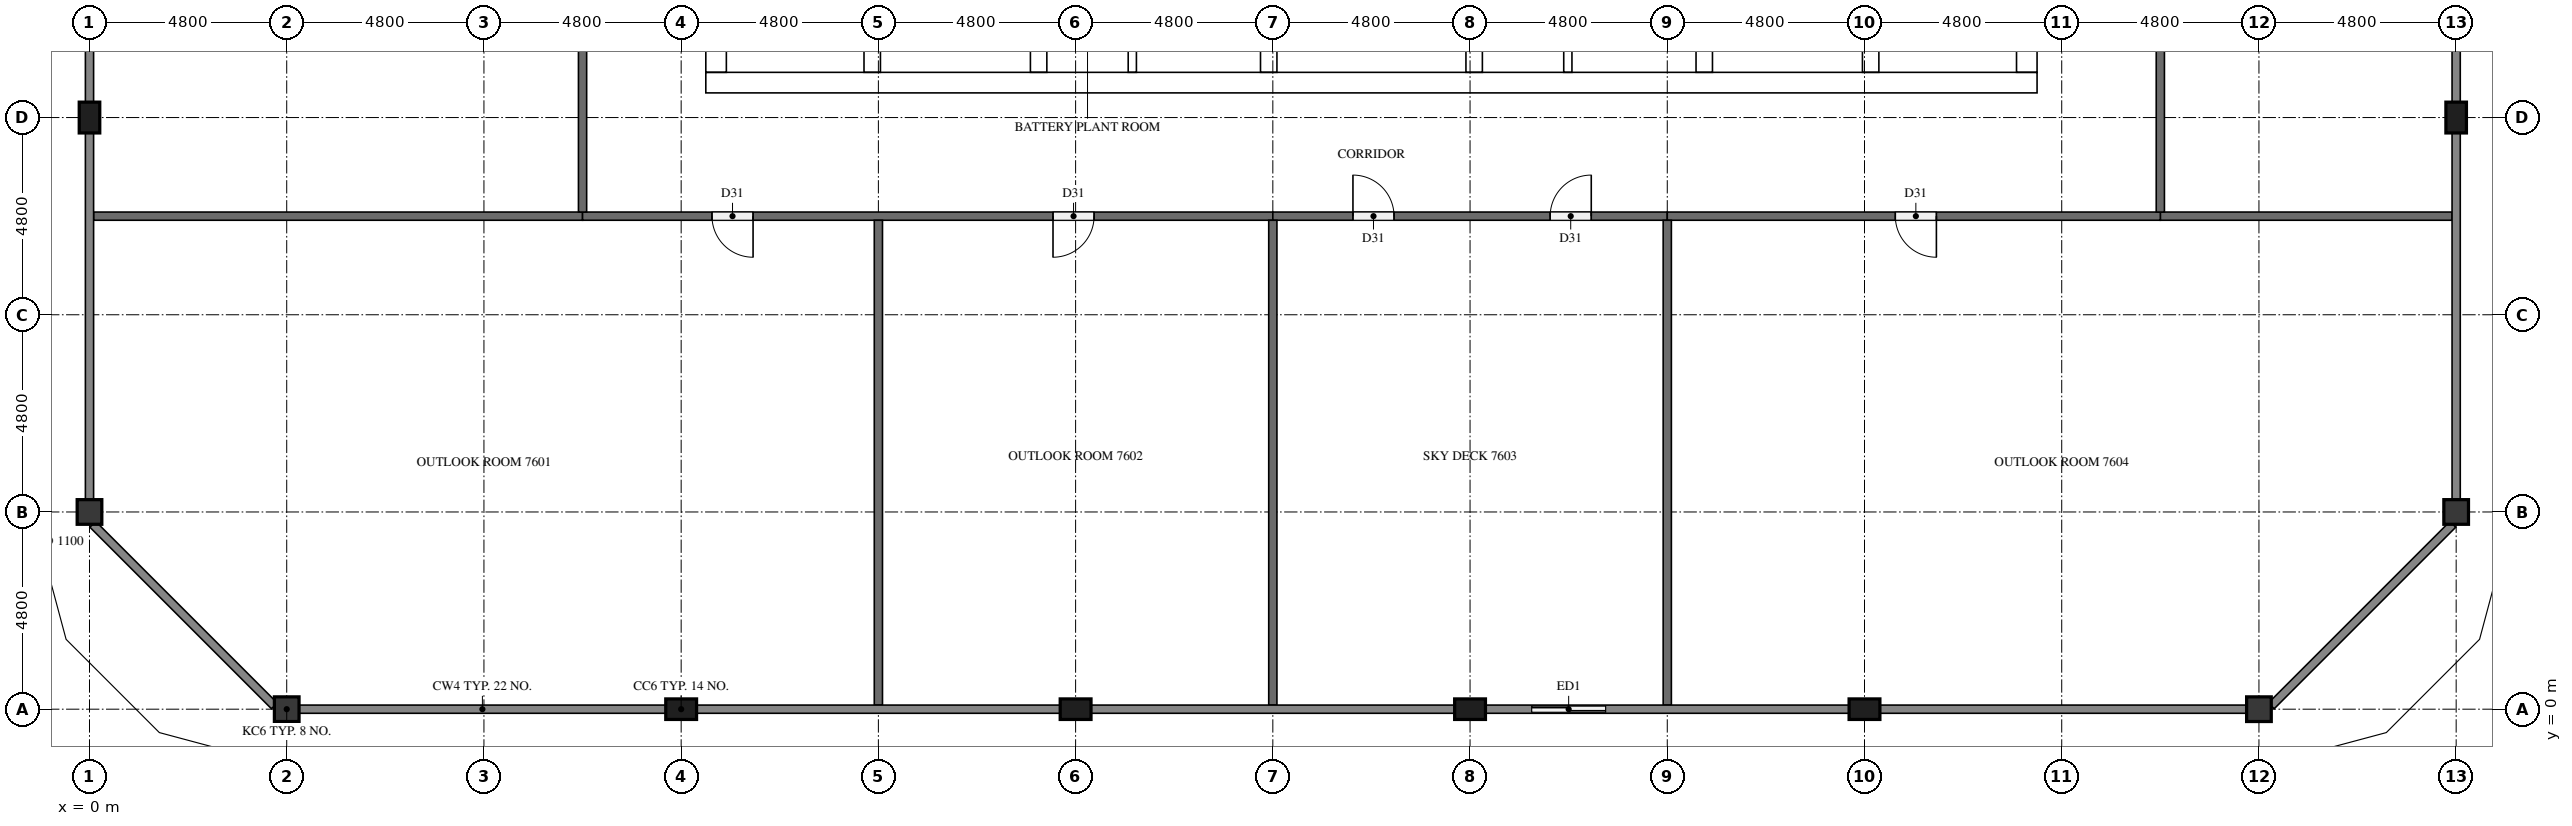
"""IFC4 building model, lengths in metres.
Left out: names, types, materials, properties, quantities, classifications, styles, units other than length and angle.
Written with IfcOpenShell. Run it as: python <this file> out.ifc"""

import sys

from ifc_helpers import new_model, si_unit, direction, frame, frame_2d, origin, origin_2d, place, context, subcontext, project, spatial, rectangle, extrude, element, fill, save


model = new_model("IFC4")
c1 = context("Model", 3, precision=1e-05, world=origin(), true_north=direction((0.0, 1.0)))
c2 = subcontext(c1, "Body", "Model", "MODEL_VIEW")
j1 = project(units=[si_unit("LENGTHUNIT", "METRE"), si_unit("PLANEANGLEUNIT", "RADIAN")], contexts=[c1])
p1 = place(None, origin())
s1 = spatial("IfcSite", under=j1, at=p1, CompositionType="ELEMENT")
p2 = place(p1, origin())
s2 = spatial("IfcBuilding", under=s1, at=p2, CompositionType="ELEMENT")
p3 = place(p2, frame((0.0, 0.0, 291.5)))
s3 = spatial("IfcBuildingStorey", under=s2, at=p3, CompositionType="ELEMENT", Elevation=291.5)
p4 = place(p3, frame((15.0, 15.25, 0.0), z_axis=(0.0, 0.0, 1.0), x_axis=(1.0, 0.0, 0.0)))
e1 = element("IfcWall", 1, at=p4, inside=s3, PredefinedType="SHEAR", context=c2, shape_type="SweptSolid", body=[
    extrude(rectangle(XDim=32.4, YDim=0.5, at=frame_2d((16.2, 0.0))), origin(), (0.0, 0.0, 1.0), 4.4),
])
p5 = place(p4, frame((15.3, 0.0, 0.0)))
e2 = element("IfcOpeningElement", 2, at=p5, cuts=e1, PredefinedType="OPENING", context=c2, shape_type="SweptSolid", body=[
    extrude(rectangle(XDim=1.8, YDim=2.1, at=frame_2d((0.9, 1.05))), frame((0.0, 0.26, 0.0), z_axis=(0.0, -1.0, 0.0), x_axis=(1.0, 0.0, 0.0)), (0.0, 0.0, 1.0), 0.52),
])
p6 = place(p3, frame((15.25, 15.5, 0.0), z_axis=(0.0, 0.0, 1.0), x_axis=(0.0, 1.0, 0.0)))
e3 = element("IfcWall", 3, at=p6, inside=s3, PredefinedType="SHEAR", context=c2, shape_type="SweptSolid", body=[
    extrude(rectangle(XDim=21.8, YDim=0.5, at=frame_2d((10.9, 0.0))), origin(), (0.0, 0.0, 1.0), 4.4),
])
p7 = place(p6, frame((5.26, 0.0, 0.0)))
e4 = element("IfcOpeningElement", 4, at=p7, cuts=e3, PredefinedType="OPENING", context=c2, shape_type="SweptSolid", body=[
    extrude(rectangle(XDim=1.2, YDim=2.1, at=frame_2d((0.6, 1.05))), frame((0.0, 0.26, 0.0), z_axis=(0.0, -1.0, 0.0), x_axis=(1.0, 0.0, 0.0)), (0.0, 0.0, 1.0), 0.52),
])
p8 = place(p3, frame((47.15, 15.5, 0.0), z_axis=(0.0, 0.0, 1.0), x_axis=(0.0, 1.0, 0.0)))
e5 = element("IfcWall", 5, at=p8, inside=s3, PredefinedType="SHEAR", context=c2, shape_type="SweptSolid", body=[
    extrude(rectangle(XDim=21.8, YDim=0.5, at=frame_2d((10.9, 0.0))), origin(), (0.0, 0.0, 1.0), 4.4),
])
p9 = place(p8, frame((10.6, 0.0, 0.0)))
e6 = element("IfcOpeningElement", 6, at=p9, cuts=e5, PredefinedType="OPENING", context=c2, shape_type="SweptSolid", body=[
    extrude(rectangle(XDim=1.2, YDim=2.1, at=frame_2d((0.6, 1.05))), frame((0.0, 0.26, 0.0), z_axis=(0.0, -1.0, 0.0), x_axis=(1.0, 0.0, 0.0)), (0.0, 0.0, 1.0), 0.52),
])
p10 = place(p3, frame((19.05, 15.5, 0.0), z_axis=(0.0, 0.0, 1.0), x_axis=(0.0, 1.0, 0.0)))
e7 = element("IfcWall", 7, at=p10, inside=s3, PredefinedType="SHEAR", context=c2, shape_type="SweptSolid", body=[
    extrude(rectangle(XDim=15.55, YDim=0.4, at=frame_2d((7.775, 0.0))), origin(), (0.0, 0.0, 1.0), 4.4),
])
p11 = place(p10, frame((9.95, 0.0, 0.0)))
e8 = element("IfcOpeningElement", 8, at=p11, cuts=e7, PredefinedType="OPENING", context=c2, shape_type="SweptSolid", body=[
    extrude(rectangle(XDim=1.1, YDim=2.1, at=frame_2d((0.55, 1.05))), frame((0.0, 0.21, 0.0), z_axis=(0.0, -1.0, 0.0), x_axis=(1.0, 0.0, 0.0)), (0.0, 0.0, 1.0), 0.42),
])
p12 = place(p10, frame((13.45, 0.0, 0.0)))
e9 = element("IfcOpeningElement", 9, at=p12, cuts=e7, PredefinedType="OPENING", context=c2, shape_type="SweptSolid", body=[
    extrude(rectangle(XDim=1.1, YDim=2.1, at=frame_2d((0.55, 1.05))), frame((0.0, 0.21, 0.0), z_axis=(0.0, -1.0, 0.0), x_axis=(1.0, 0.0, 0.0)), (0.0, 0.0, 1.0), 0.42),
])
p13 = place(p10, frame((0.7, 0.0, 0.0)))
e10 = element("IfcOpeningElement", 10, at=p13, cuts=e7, PredefinedType="OPENING", context=c2, shape_type="SweptSolid", body=[
    extrude(rectangle(XDim=1.2, YDim=2.1, at=frame_2d((0.6, 1.05))), frame((0.0, 0.21, 0.0), z_axis=(0.0, -1.0, 0.0), x_axis=(1.0, 0.0, 0.0)), (0.0, 0.0, 1.0), 0.42),
])
p14 = place(p3, frame((23.1, 15.5, 0.0), z_axis=(0.0, 0.0, 1.0), x_axis=(0.0, 1.0, 0.0)))
e11 = element("IfcWall", 11, at=p14, inside=s3, PredefinedType="SHEAR", context=c2, shape_type="SweptSolid", body=[
    extrude(rectangle(XDim=21.8, YDim=0.4, at=frame_2d((10.9, 0.0))), origin(), (0.0, 0.0, 1.0), 4.4),
])
p15 = place(p3, frame((39.3, 15.5, 0.0), z_axis=(0.0, 0.0, 1.0), x_axis=(0.0, 1.0, 0.0)))
e12 = element("IfcWall", 12, at=p15, inside=s3, PredefinedType="SHEAR", context=c2, shape_type="SweptSolid", body=[
    extrude(rectangle(XDim=8.75, YDim=0.4, at=frame_2d((4.375, 0.0))), origin(), (0.0, 0.0, 1.0), 4.4),
])
p16 = place(p3, frame((43.35, 15.5, 0.0), z_axis=(0.0, 0.0, 1.0), x_axis=(0.0, 1.0, 0.0)))
e13 = element("IfcWall", 13, at=p16, inside=s3, PredefinedType="SHEAR", context=c2, shape_type="SweptSolid", body=[
    extrude(rectangle(XDim=8.75, YDim=0.4, at=frame_2d((4.375, 0.0))), origin(), (0.0, 0.0, 1.0), 4.4),
])
p17 = place(p16, frame((0.7, 0.0, 0.0)))
e14 = element("IfcOpeningElement", 14, at=p17, cuts=e13, PredefinedType="OPENING", context=c2, shape_type="SweptSolid", body=[
    extrude(rectangle(XDim=1.2, YDim=2.1, at=frame_2d((0.6, 1.05))), frame((0.0, 0.21, 0.0), z_axis=(0.0, -1.0, 0.0), x_axis=(1.0, 0.0, 0.0)), (0.0, 0.0, 1.0), 0.42),
])
for number, where, z_axis, x_axis in (
    (15, (28.7, 15.5, 0.0), (0.0, 0.0, 1.0), (0.0, 1.0, 0.0)),
    (16, (33.7, 15.5, 0.0), (0.0, 0.0, 1.0), (0.0, 1.0, 0.0)),
):
    element("IfcWall", number, at=place(p3, frame(where, z_axis=z_axis, x_axis=x_axis)), inside=s3, PredefinedType="SHEAR", context=c2, shape_type="SweptSolid", body=[
        extrude(rectangle(XDim=3.05, YDim=0.4, at=frame_2d((1.525, 0.0))), origin(), (0.0, 0.0, 1.0), 4.4),
    ])
p18 = place(p3, frame((4.8, 0.0, 0.0), z_axis=(0.0, 0.0, 1.0), x_axis=(1.0, 0.0, 0.0)))
e17 = element("IfcColumn", 17, at=p18, inside=s3, PredefinedType="COLUMN", context=c2, shape_type="SweptSolid", body=[
    extrude(rectangle(XDim=0.6, YDim=0.6, at=origin_2d()), origin(), (0.0, 0.0, 1.0), 4.4),
])
for number, where, z_axis, x_axis in (
    (18, (14.4, 0.0, 0.0), (0.0, 0.0, 1.0), (1.0, 0.0, 0.0)),
    (19, (24.0, 0.0, 0.0), (0.0, 0.0, 1.0), (1.0, 0.0, 0.0)),
    (20, (33.6, 0.0, 0.0), (0.0, 0.0, 1.0), (1.0, 0.0, 0.0)),
    (21, (43.2, 0.0, 0.0), (0.0, 0.0, 1.0), (1.0, 0.0, 0.0)),
):
    element("IfcColumn", number, at=place(p3, frame(where, z_axis=z_axis, x_axis=x_axis)), inside=s3, PredefinedType="COLUMN", context=c2, shape_type="SweptSolid", body=[
        extrude(rectangle(XDim=0.75, YDim=0.5, at=origin_2d()), origin(), (0.0, 0.0, 1.0), 4.4),
    ])
for number, where, z_axis, x_axis in (
    (22, (52.8, 0.0, 0.0), (0.0, 0.0, 1.0), (1.0, 0.0, 0.0)),
    (23, (57.6, 4.8, 0.0), (0.0, 0.0, 1.0), (1.0, 0.0, 0.0)),
):
    element("IfcColumn", number, at=place(p3, frame(where, z_axis=z_axis, x_axis=x_axis)), inside=s3, PredefinedType="COLUMN", context=c2, shape_type="SweptSolid", body=[
        extrude(rectangle(XDim=0.6, YDim=0.6, at=origin_2d()), origin(), (0.0, 0.0, 1.0), 4.4),
    ])
for number, where, z_axis, x_axis in (
    (24, (57.6, 14.4, 0.0), (0.0, 0.0, 1.0), (0.0, 1.0, 0.0)),
    (25, (0.0, 14.4, 0.0), (0.0, 0.0, 1.0), (0.0, 1.0, 0.0)),
):
    element("IfcColumn", number, at=place(p3, frame(where, z_axis=z_axis, x_axis=x_axis)), inside=s3, PredefinedType="COLUMN", context=c2, shape_type="SweptSolid", body=[
        extrude(rectangle(XDim=0.75, YDim=0.5, at=origin_2d()), origin(), (0.0, 0.0, 1.0), 4.4),
    ])
p19 = place(p3, frame((0.0, 4.8, 0.0), z_axis=(0.0, 0.0, 1.0), x_axis=(1.0, 0.0, 0.0)))
e26 = element("IfcColumn", 26, at=p19, inside=s3, PredefinedType="COLUMN", context=c2, shape_type="SweptSolid", body=[
    extrude(rectangle(XDim=0.6, YDim=0.6, at=origin_2d()), origin(), (0.0, 0.0, 1.0), 4.4),
])
p20 = place(p3, frame((34.8, 0.0, 0.0), z_axis=(0.0, 0.0, 1.0), x_axis=(1.0, 0.0, 0.0)))
e27 = element("IfcWall", 27, at=p20, inside=s3, PredefinedType="SOLIDWALL", context=c2, shape_type="SweptSolid", body=[
    extrude(rectangle(XDim=2.4, YDim=0.15, at=frame_2d((1.2, 0.0))), origin(), (0.0, 0.0, 1.0), 4.4),
])
p21 = place(p20, frame((0.3, 0.0, 0.0)))
e28 = element("IfcOpeningElement", 28, at=p21, cuts=e27, PredefinedType="OPENING", context=c2, shape_type="SweptSolid", body=[
    extrude(rectangle(XDim=1.8, YDim=2.4, at=frame_2d((0.9, 1.2))), frame((0.0, 0.085, 0.0), z_axis=(0.0, -1.0, 0.0), x_axis=(1.0, 0.0, 0.0)), (0.0, 0.0, 1.0), 0.17),
])
for number, where, z_axis, x_axis in (
    (29, (25.38, 15.5, 0.0), (0.0, 0.0, 1.0), (0.0, 1.0, 0.0)),
    (30, (35.98, 15.5, 0.0), (0.0, 0.0, 1.0), (0.0, 1.0, 0.0)),
):
    element("IfcWall", number, at=place(p3, frame(where, z_axis=z_axis, x_axis=x_axis)), inside=s3, PredefinedType="PARTITIONING", context=c2, shape_type="SweptSolid", body=[
        extrude(rectangle(XDim=3.05, YDim=0.2, at=frame_2d((1.525, 0.0))), origin(), (0.0, 0.0, 1.0), 4.4),
    ])
p22 = place(p3, frame((0.1, 12.0, 0.0), z_axis=(0.0, 0.0, 1.0), x_axis=(1.0, 0.0, 0.0)))
e31 = element("IfcWall", 31, at=p22, inside=s3, PredefinedType="PARTITIONING", context=c2, shape_type="SweptSolid", body=[
    extrude(rectangle(XDim=11.9, YDim=0.2, at=frame_2d((5.95, 0.0))), origin(), (0.0, 0.0, 1.0), 4.4),
])
p23 = place(p3, frame((50.4, 12.0, 0.0), z_axis=(0.0, 0.0, 1.0), x_axis=(1.0, 0.0, 0.0)))
e32 = element("IfcWall", 32, at=p23, inside=s3, PredefinedType="PARTITIONING", context=c2, shape_type="SweptSolid", body=[
    extrude(rectangle(XDim=7.1, YDim=0.2, at=frame_2d((3.55, 0.0))), origin(), (0.0, 0.0, 1.0), 4.4),
])
p24 = place(p3, frame((28.8, 12.0, 0.0), z_axis=(0.0, 0.0, 1.0), x_axis=(-1.0, 0.0, 0.0)))
e33 = element("IfcWall", 33, at=p24, inside=s3, PredefinedType="PARTITIONING", context=c2, shape_type="SweptSolid", body=[
    extrude(rectangle(XDim=16.8, YDim=0.2, at=frame_2d((8.4, 0.0))), origin(), (0.0, 0.0, 1.0), 4.4),
])
p25 = place(p24, frame((12.65, 0.0, 0.0)))
e34 = element("IfcOpeningElement", 34, at=p25, cuts=e33, PredefinedType="OPENING", context=c2, shape_type="SweptSolid", body=[
    extrude(rectangle(XDim=1.0, YDim=2.1, at=frame_2d((0.5, 1.05))), frame((0.0, 0.11, 0.0), z_axis=(0.0, -1.0, 0.0), x_axis=(1.0, 0.0, 0.0)), (0.0, 0.0, 1.0), 0.22),
])
p26 = place(p24, frame((4.35, 0.0, 0.0)))
e35 = element("IfcOpeningElement", 35, at=p26, cuts=e33, PredefinedType="OPENING", context=c2, shape_type="SweptSolid", body=[
    extrude(rectangle(XDim=1.0, YDim=2.1, at=frame_2d((0.5, 1.05))), frame((0.0, 0.11, 0.0), z_axis=(0.0, -1.0, 0.0), x_axis=(1.0, 0.0, 0.0)), (0.0, 0.0, 1.0), 0.22),
])
p27 = place(p3, frame((28.8, 12.0, 0.0), z_axis=(0.0, 0.0, 1.0), x_axis=(1.0, 0.0, 0.0)))
e36 = element("IfcWall", 36, at=p27, inside=s3, PredefinedType="PARTITIONING", context=c2, shape_type="SweptSolid", body=[
    extrude(rectangle(XDim=9.6, YDim=0.2, at=frame_2d((4.8, 0.0))), origin(), (0.0, 0.0, 1.0), 4.4),
])
p28 = place(p27, frame((6.75, 0.0, 0.0)))
e37 = element("IfcOpeningElement", 37, at=p28, cuts=e36, PredefinedType="OPENING", context=c2, shape_type="SweptSolid", body=[
    extrude(rectangle(XDim=1.0, YDim=2.1, at=frame_2d((0.5, 1.05))), frame((0.0, 0.11, 0.0), z_axis=(0.0, -1.0, 0.0), x_axis=(1.0, 0.0, 0.0)), (0.0, 0.0, 1.0), 0.22),
])
p29 = place(p27, frame((1.95, 0.0, 0.0)))
e38 = element("IfcOpeningElement", 38, at=p29, cuts=e36, PredefinedType="OPENING", context=c2, shape_type="SweptSolid", body=[
    extrude(rectangle(XDim=1.0, YDim=2.1, at=frame_2d((0.5, 1.05))), frame((0.0, 0.11, 0.0), z_axis=(0.0, -1.0, 0.0), x_axis=(1.0, 0.0, 0.0)), (0.0, 0.0, 1.0), 0.22),
])
p30 = place(p3, frame((50.4, 12.0, 0.0), z_axis=(0.0, 0.0, 1.0), x_axis=(-1.0, 0.0, 0.0)))
e39 = element("IfcWall", 39, at=p30, inside=s3, PredefinedType="PARTITIONING", context=c2, shape_type="SweptSolid", body=[
    extrude(rectangle(XDim=12.0, YDim=0.2, at=frame_2d((6.0, 0.0))), origin(), (0.0, 0.0, 1.0), 4.4),
])
p31 = place(p30, frame((5.45, 0.0, 0.0)))
e40 = element("IfcOpeningElement", 40, at=p31, cuts=e39, PredefinedType="OPENING", context=c2, shape_type="SweptSolid", body=[
    extrude(rectangle(XDim=1.0, YDim=2.1, at=frame_2d((0.5, 1.05))), frame((0.0, 0.11, 0.0), z_axis=(0.0, -1.0, 0.0), x_axis=(1.0, 0.0, 0.0)), (0.0, 0.0, 1.0), 0.22),
])
p32 = place(p3, frame((12.0, 12.1, 0.0), z_axis=(0.0, 0.0, 1.0), x_axis=(0.0, 1.0, 0.0)))
e41 = element("IfcWall", 41, at=p32, inside=s3, PredefinedType="PARTITIONING", context=c2, shape_type="SweptSolid", body=[
    extrude(rectangle(XDim=28.6, YDim=0.2, at=frame_2d((14.3, 0.0))), origin(), (0.0, 0.0, 1.0), 4.4),
])
p33 = place(p32, frame((7.85, 0.0, 0.0)))
e42 = element("IfcOpeningElement", 42, at=p33, cuts=e41, PredefinedType="OPENING", context=c2, shape_type="SweptSolid", body=[
    extrude(rectangle(XDim=1.0, YDim=2.1, at=frame_2d((0.5, 1.05))), frame((0.0, 0.11, 0.0), z_axis=(0.0, -1.0, 0.0), x_axis=(1.0, 0.0, 0.0)), (0.0, 0.0, 1.0), 0.22),
])
p34 = place(p32, frame((22.15, 0.0, 0.0)))
e43 = element("IfcOpeningElement", 43, at=p34, cuts=e41, PredefinedType="OPENING", context=c2, shape_type="SweptSolid", body=[
    extrude(rectangle(XDim=1.0, YDim=2.1, at=frame_2d((0.5, 1.05))), frame((0.0, 0.11, 0.0), z_axis=(0.0, -1.0, 0.0), x_axis=(1.0, 0.0, 0.0)), (0.0, 0.0, 1.0), 0.22),
])
for number, where, z_axis, x_axis in (
    (44, (19.2, 0.1, 0.0), (0.0, 0.0, 1.0), (0.0, 1.0, 0.0)),
    (45, (28.8, 0.1, 0.0), (0.0, 0.0, 1.0), (0.0, 1.0, 0.0)),
    (46, (38.4, 0.1, 0.0), (0.0, 0.0, 1.0), (0.0, 1.0, 0.0)),
):
    element("IfcWall", number, at=place(p3, frame(where, z_axis=z_axis, x_axis=x_axis)), inside=s3, PredefinedType="PARTITIONING", context=c2, shape_type="SweptSolid", body=[
        extrude(rectangle(XDim=11.8, YDim=0.2, at=frame_2d((5.9, 0.0))), origin(), (0.0, 0.0, 1.0), 4.4),
    ])
p35 = place(p3, frame((50.4, 40.7, 0.0), z_axis=(0.0, 0.0, 1.0), x_axis=(0.0, -1.0, 0.0)))
e47 = element("IfcWall", 47, at=p35, inside=s3, PredefinedType="PARTITIONING", context=c2, shape_type="SweptSolid", body=[
    extrude(rectangle(XDim=28.6, YDim=0.2, at=frame_2d((14.3, 0.0))), origin(), (0.0, 0.0, 1.0), 4.4),
])
p36 = place(p35, frame((19.75, 0.0, 0.0)))
e48 = element("IfcOpeningElement", 48, at=p36, cuts=e47, PredefinedType="OPENING", context=c2, shape_type="SweptSolid", body=[
    extrude(rectangle(XDim=1.0, YDim=2.1, at=frame_2d((0.5, 1.05))), frame((0.0, 0.11, 0.0), z_axis=(0.0, -1.0, 0.0), x_axis=(1.0, 0.0, 0.0)), (0.0, 0.0, 1.0), 0.22),
])
p37 = place(p35, frame((5.45, 0.0, 0.0)))
e49 = element("IfcOpeningElement", 49, at=p37, cuts=e47, PredefinedType="OPENING", context=c2, shape_type="SweptSolid", body=[
    extrude(rectangle(XDim=1.0, YDim=2.1, at=frame_2d((0.5, 1.05))), frame((0.0, 0.11, 0.0), z_axis=(0.0, -1.0, 0.0), x_axis=(1.0, 0.0, 0.0)), (0.0, 0.0, 1.0), 0.22),
])
p38 = place(p21, origin())
e50 = element("IfcDoor", 50, at=p38, inside=s3, OperationType="SLIDING_TO_LEFT", PredefinedType="DOOR", context=c2, shape_type="SweptSolid", body=[
    extrude(rectangle(XDim=1.8, YDim=2.4, at=frame_2d((0.9, 1.2))), frame((0.0, 0.025, 0.0), z_axis=(0.0, -1.0, 0.0), x_axis=(1.0, 0.0, 0.0)), (0.0, 0.0, 1.0), 0.05),
])
fill(e28, e50)
p39 = place(p5, frame((1.8, 0.0, 0.0), z_axis=(0.0, 0.0, 1.0), x_axis=(-1.0, 0.0, 0.0)))
e51 = element("IfcDoor", 51, at=p39, inside=s3, OperationType="DOUBLE_DOOR_SINGLE_SWING", PredefinedType="DOOR", context=c2, shape_type="SweptSolid", body=[
    extrude(rectangle(XDim=1.8, YDim=2.1, at=frame_2d((0.9, 1.05))), frame((0.0, 0.025, 0.0), z_axis=(0.0, -1.0, 0.0), x_axis=(1.0, 0.0, 0.0)), (0.0, 0.0, 1.0), 0.05),
])
fill(e2, e51)
p40 = place(p25, origin())
e52 = element("IfcDoor", 52, at=p40, inside=s3, OperationType="SINGLE_SWING_LEFT", PredefinedType="DOOR", context=c2, shape_type="SweptSolid", body=[
    extrude(rectangle(XDim=1.0, YDim=2.1, at=frame_2d((0.5, 1.05))), frame((0.0, 0.025, 0.0), z_axis=(0.0, -1.0, 0.0), x_axis=(1.0, 0.0, 0.0)), (0.0, 0.0, 1.0), 0.05),
])
fill(e34, e52)
p41 = place(p26, origin())
e53 = element("IfcDoor", 53, at=p41, inside=s3, OperationType="SINGLE_SWING_RIGHT", PredefinedType="DOOR", context=c2, shape_type="SweptSolid", body=[
    extrude(rectangle(XDim=1.0, YDim=2.1, at=frame_2d((0.5, 1.05))), frame((0.0, 0.025, 0.0), z_axis=(0.0, -1.0, 0.0), x_axis=(1.0, 0.0, 0.0)), (0.0, 0.0, 1.0), 0.05),
])
fill(e35, e53)
p42 = place(p28, origin())
e54 = element("IfcDoor", 54, at=p42, inside=s3, OperationType="SINGLE_SWING_RIGHT", PredefinedType="DOOR", context=c2, shape_type="SweptSolid", body=[
    extrude(rectangle(XDim=1.0, YDim=2.1, at=frame_2d((0.5, 1.05))), frame((0.0, 0.025, 0.0), z_axis=(0.0, -1.0, 0.0), x_axis=(1.0, 0.0, 0.0)), (0.0, 0.0, 1.0), 0.05),
])
fill(e37, e54)
p43 = place(p29, origin())
e55 = element("IfcDoor", 55, at=p43, inside=s3, OperationType="SINGLE_SWING_LEFT", PredefinedType="DOOR", context=c2, shape_type="SweptSolid", body=[
    extrude(rectangle(XDim=1.0, YDim=2.1, at=frame_2d((0.5, 1.05))), frame((0.0, 0.025, 0.0), z_axis=(0.0, -1.0, 0.0), x_axis=(1.0, 0.0, 0.0)), (0.0, 0.0, 1.0), 0.05),
])
fill(e38, e55)
p44 = place(p31, origin())
e56 = element("IfcDoor", 56, at=p44, inside=s3, OperationType="SINGLE_SWING_LEFT", PredefinedType="DOOR", context=c2, shape_type="SweptSolid", body=[
    extrude(rectangle(XDim=1.0, YDim=2.1, at=frame_2d((0.5, 1.05))), frame((0.0, 0.025, 0.0), z_axis=(0.0, -1.0, 0.0), x_axis=(1.0, 0.0, 0.0)), (0.0, 0.0, 1.0), 0.05),
])
fill(e40, e56)
save(model, sys.argv[1])
